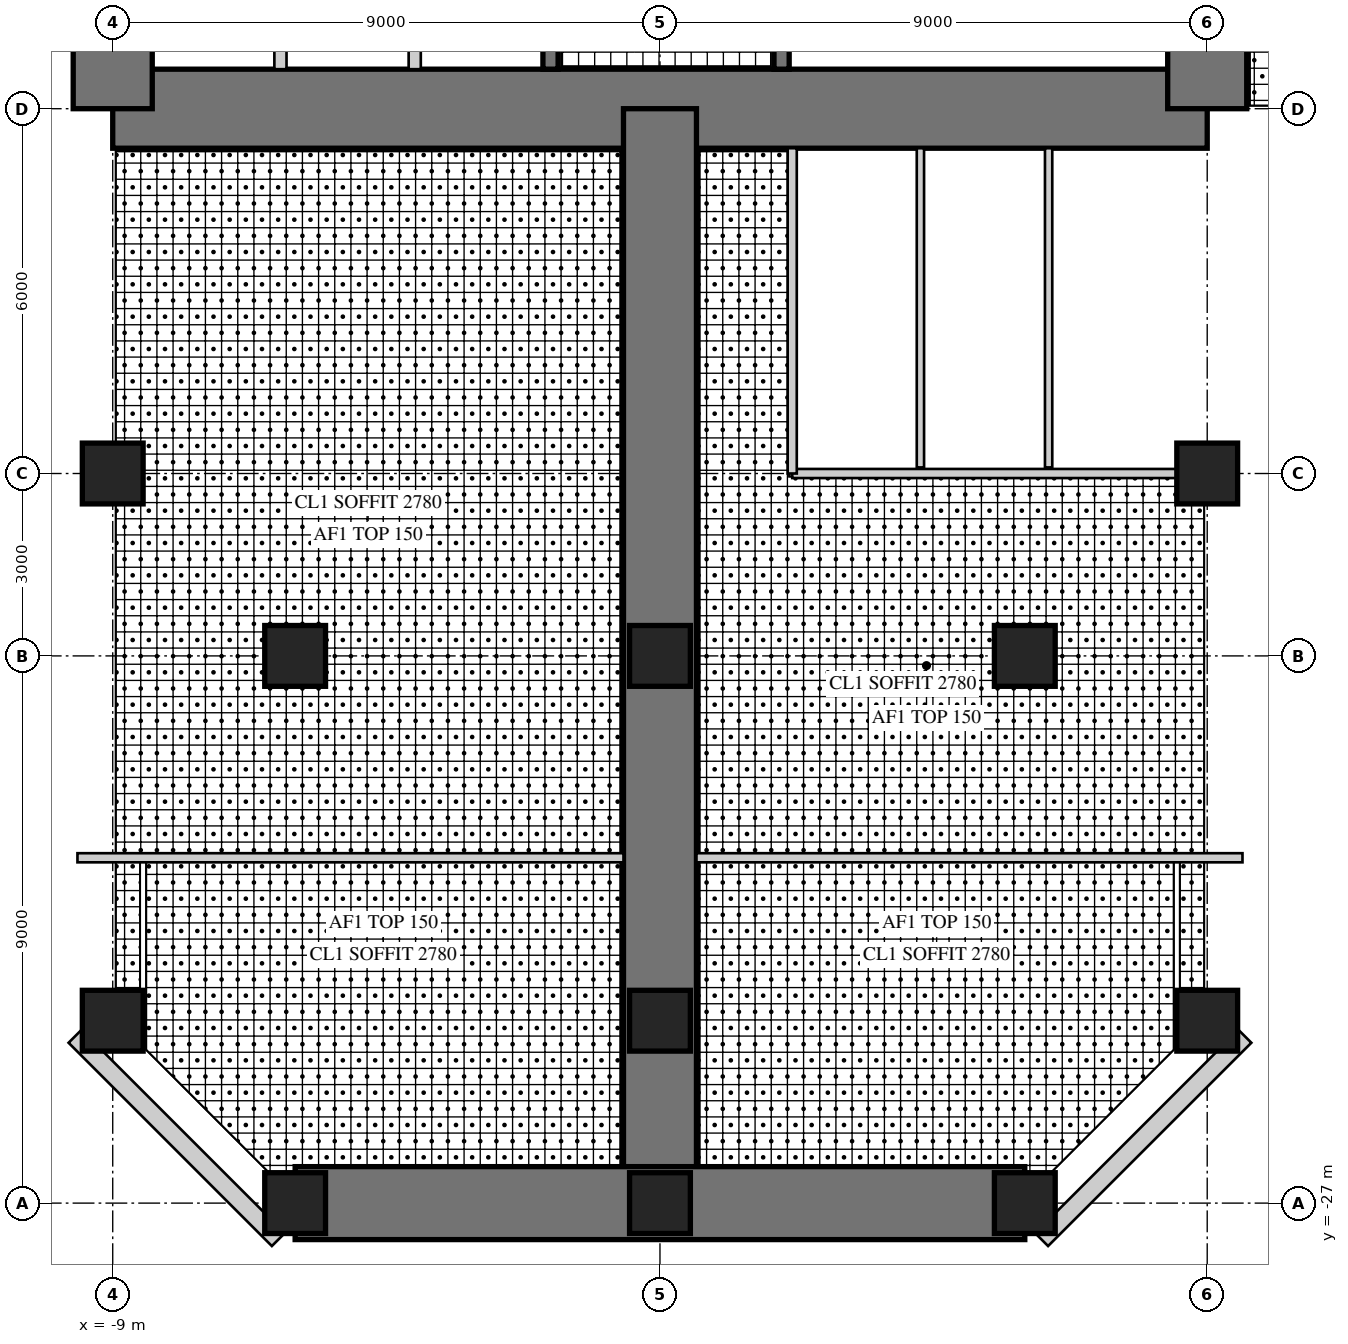
"""IFC4 building model, lengths in metres.
Left out: names, types, materials, properties, quantities, classifications, styles, units other than length and angle.
Written with IfcOpenShell. Run it as: python <this file> out.ifc"""

import sys

from ifc_helpers import new_model, si_unit, direction, frame, frame_2d, origin, origin_2d, place, context, subcontext, project, spatial, rectangle, hollow_rectangle, extrude, element, fill, save


model = new_model("IFC4")
c1 = context("Model", 3, precision=1e-05, world=origin(), true_north=direction((0.0, 1.0)))
c2 = subcontext(c1, "Body", "Model", "MODEL_VIEW")
j1 = project(units=[si_unit("LENGTHUNIT", "METRE"), si_unit("PLANEANGLEUNIT", "RADIAN")], contexts=[c1])
p1 = place(None, origin())
s1 = spatial("IfcSite", under=j1, at=p1, CompositionType="ELEMENT")
p2 = place(p1, origin())
s2 = spatial("IfcBuilding", under=s1, at=p2, CompositionType="ELEMENT")
p3 = place(p2, frame((0.0, 0.0, 144.5)))
s3 = spatial("IfcBuildingStorey", under=s2, at=p3, CompositionType="ELEMENT", Elevation=144.5)
p4 = place(p3, frame((-9.0, -9.0, 0.0), z_axis=(0.0, 0.0, 1.0), x_axis=(1.0, 0.0, 0.0)))
e1 = element("IfcWall", 1, at=p4, inside=s3, PredefinedType="SHEAR", context=c2, shape_type="SweptSolid", body=[
    extrude(rectangle(XDim=18.0, YDim=1.3, at=frame_2d((9.0, 0.0))), origin(), (0.0, 0.0, 1.0), 4.0),
])
p5 = place(p4, frame((9.8, 0.0, 0.0)))
e2 = element("IfcOpeningElement", 2, at=p5, cuts=e1, PredefinedType="OPENING", context=c2, shape_type="SweptSolid", body=[
    extrude(rectangle(XDim=1.0, YDim=2.4, at=frame_2d((0.5, 1.2))), frame((0.0, 0.66, 0.0), z_axis=(0.0, -1.0, 0.0), x_axis=(1.0, 0.0, 0.0)), (0.0, 0.0, 1.0), 1.32),
])
p6 = place(p3, frame((9.0, -9.0, 0.0), z_axis=(0.0, 0.0, 1.0), x_axis=(0.0, 1.0, 0.0)))
e3 = element("IfcWall", 3, at=p6, inside=s3, PredefinedType="SHEAR", context=c2, shape_type="SweptSolid", body=[
    extrude(rectangle(XDim=18.0, YDim=1.3, at=frame_2d((9.0, 0.0))), origin(), (0.0, 0.0, 1.0), 4.0),
])
p7 = place(p6, frame((9.8, 0.0, 0.0)))
e4 = element("IfcOpeningElement", 4, at=p7, cuts=e3, PredefinedType="OPENING", context=c2, shape_type="SweptSolid", body=[
    extrude(rectangle(XDim=1.0, YDim=2.4, at=frame_2d((0.5, 1.2))), frame((0.0, 0.66, 0.0), z_axis=(0.0, -1.0, 0.0), x_axis=(1.0, 0.0, 0.0)), (0.0, 0.0, 1.0), 1.32),
])
p8 = place(p3, frame((-9.0, 9.0, 0.0), z_axis=(0.0, 0.0, 1.0), x_axis=(0.0, -1.0, 0.0)))
e5 = element("IfcWall", 5, at=p8, inside=s3, PredefinedType="SHEAR", context=c2, shape_type="SweptSolid", body=[
    extrude(rectangle(XDim=18.0, YDim=1.3, at=frame_2d((9.0, 0.0))), origin(), (0.0, 0.0, 1.0), 4.0),
])
p9 = place(p8, frame((9.8, 0.0, 0.0)))
e6 = element("IfcOpeningElement", 6, at=p9, cuts=e5, PredefinedType="OPENING", context=c2, shape_type="SweptSolid", body=[
    extrude(rectangle(XDim=1.0, YDim=2.4, at=frame_2d((0.5, 1.2))), frame((0.0, 0.66, 0.0), z_axis=(0.0, -1.0, 0.0), x_axis=(1.0, 0.0, 0.0)), (0.0, 0.0, 1.0), 1.32),
])
p10 = place(p3, frame((-1.8, -1.875, 0.0), z_axis=(0.0, 0.0, 1.0), x_axis=(0.0, -1.0, 0.0)))
e7 = element("IfcWall", 7, at=p10, inside=s3, PredefinedType="SHEAR", context=c2, shape_type="SweptSolid", body=[
    extrude(rectangle(XDim=6.475, YDim=0.25, at=frame_2d((3.238, 0.0))), origin(), (0.0, 0.0, 1.0), 4.0),
])
p11 = place(p10, frame((1.875, 0.0, 0.0)))
e8 = element("IfcOpeningElement", 8, at=p11, cuts=e7, PredefinedType="OPENING", context=c2, shape_type="SweptSolid", body=[
    extrude(rectangle(XDim=1.6, YDim=2.4, at=frame_2d((0.8, 1.2))), frame((0.0, 0.135, 0.0), z_axis=(0.0, -1.0, 0.0), x_axis=(1.0, 0.0, 0.0)), (0.0, 0.0, 1.0), 0.27),
])
for number, where, z_axis, x_axis in (
    (9, (-4.033, -5.975, 0.0), (0.0, 0.0, 1.0), (0.0, -1.0, 0.0)),
    (10, (-6.242, -5.975, 0.0), (0.0, 0.0, 1.0), (0.0, -1.0, 0.0)),
):
    element("IfcWall", number, at=place(p3, frame(where, z_axis=z_axis, x_axis=x_axis)), inside=s3, PredefinedType="PARTITIONING", context=c2, shape_type="SweptSolid", body=[
        extrude(rectangle(XDim=2.375, YDim=0.2, at=frame_2d((1.188, 0.0))), origin(), (0.0, 0.0, 1.0), 4.0),
    ])
p12 = place(p3, frame((2.0, -1.675, 0.0), z_axis=(0.0, 0.0, 1.0), x_axis=(0.0, -1.0, 0.0)))
e11 = element("IfcWall", 11, at=p12, inside=s3, PredefinedType="SHEAR", context=c2, shape_type="SweptSolid", body=[
    extrude(rectangle(XDim=6.675, YDim=0.25, at=frame_2d((3.337, 0.0))), origin(), (0.0, 0.0, 1.0), 4.0),
])
p13 = place(p12, frame((0.725, 0.0, 0.0)))
e12 = element("IfcOpeningElement", 12, at=p13, cuts=e11, PredefinedType="OPENING", context=c2, shape_type="SweptSolid", body=[
    extrude(rectangle(XDim=1.0, YDim=2.1, at=frame_2d((0.5, 1.05))), frame((0.0, 0.135, 0.0), z_axis=(0.0, -1.0, 0.0), x_axis=(1.0, 0.0, 0.0)), (0.0, 0.0, 1.0), 0.27),
])
p14 = place(p3, frame((0.0, -9.0, 0.0), z_axis=(0.0, 0.0, 1.0), x_axis=(0.0, -1.0, 0.0)))
e13 = element("IfcWall", 13, at=p14, inside=s3, PredefinedType="SHEAR", context=c2, shape_type="SweptSolid", body=[
    extrude(rectangle(XDim=18.0, YDim=1.2, at=frame_2d((9.0, 0.0))), origin(), (0.0, 0.0, 1.0), 4.0),
])
p15 = place(p14, frame((9.8, 0.0, 0.0)))
e14 = element("IfcOpeningElement", 14, at=p15, cuts=e13, PredefinedType="OPENING", context=c2, shape_type="SweptSolid", body=[
    extrude(rectangle(XDim=1.0, YDim=2.2, at=frame_2d((0.5, 1.1))), frame((0.0, 0.61, 0.0), z_axis=(0.0, -1.0, 0.0), x_axis=(1.0, 0.0, 0.0)), (0.0, 0.0, 1.0), 1.22),
])
p16 = place(p3, frame((-6.0, -27.0, 0.0), z_axis=(0.0, 0.0, 1.0), x_axis=(1.0, 0.0, 0.0)))
e15 = element("IfcWall", 15, at=p16, inside=s3, PredefinedType="SHEAR", context=c2, shape_type="SweptSolid", body=[
    extrude(rectangle(XDim=12.0, YDim=1.2, at=frame_2d((6.0, 0.0))), origin(), (0.0, 0.0, 1.0), 4.0),
])
p17 = place(p16, frame((1.55, 0.0, 0.6)))
e16 = element("IfcOpeningElement", 16, at=p17, cuts=e15, PredefinedType="OPENING", context=c2, shape_type="SweptSolid", body=[
    extrude(rectangle(XDim=3.0, YDim=2.4, at=frame_2d((1.5, 1.2))), frame((0.0, 0.61, 0.0), z_axis=(0.0, -1.0, 0.0), x_axis=(1.0, 0.0, 0.0)), (0.0, 0.0, 1.0), 1.22),
])
p18 = place(p16, frame((7.45, 0.0, 0.6)))
e17 = element("IfcOpeningElement", 17, at=p18, cuts=e15, PredefinedType="OPENING", context=c2, shape_type="SweptSolid", body=[
    extrude(rectangle(XDim=3.0, YDim=2.4, at=frame_2d((1.5, 1.2))), frame((0.0, 0.61, 0.0), z_axis=(0.0, -1.0, 0.0), x_axis=(1.0, 0.0, 0.0)), (0.0, 0.0, 1.0), 1.22),
])
for number, where, z_axis, x_axis in (
    (18, (-9.0, -15.0, 0.0), (0.0, 0.0, 1.0), (1.0, 0.0, 0.0)),
    (19, (-9.0, -24.0, 0.0), (0.0, 0.0, 1.0), (1.0, 0.0, 0.0)),
    (20, (9.0, -15.0, 0.0), (0.0, 0.0, 1.0), (1.0, 0.0, 0.0)),
    (21, (9.0, -24.0, 0.0), (0.0, 0.0, 1.0), (1.0, 0.0, 0.0)),
    (22, (-6.0, -27.0, 0.0), (0.0, 0.0, 1.0), (1.0, 0.0, 0.0)),
    (23, (0.0, -27.0, 0.0), (0.0, 0.0, 1.0), (1.0, 0.0, 0.0)),
    (24, (6.0, -27.0, 0.0), (0.0, 0.0, 1.0), (1.0, 0.0, 0.0)),
    (25, (-6.0, -18.0, 0.0), (0.0, 0.0, 1.0), (1.0, 0.0, 0.0)),
    (26, (0.0, -18.0, 0.0), (0.0, 0.0, 1.0), (1.0, 0.0, 0.0)),
    (27, (6.0, -18.0, 0.0), (0.0, 0.0, 1.0), (1.0, 0.0, 0.0)),
    (28, (0.0, -24.0, 0.0), (0.0, 0.0, 1.0), (1.0, 0.0, 0.0)),
):
    element("IfcColumn", number, at=place(p3, frame(where, z_axis=z_axis, x_axis=x_axis)), inside=s3, PredefinedType="COLUMN", context=c2, shape_type="SweptSolid", body=[
        extrude(rectangle(XDim=1.0, YDim=1.0, at=origin_2d()), origin(), (0.0, 0.0, 1.0), 4.0),
    ])
p19 = place(p3, frame((-9.62, -24.257, 0.0), z_axis=(0.0, 0.0, 1.0), x_axis=(0.707106781187, -0.707106781187, 0.0)))
e29 = element("IfcWall", 29, at=p19, inside=s3, PredefinedType="SOLIDWALL", context=c2, shape_type="SweptSolid", body=[
    extrude(rectangle(XDim=4.728, YDim=0.3, at=frame_2d((2.364, 0.0))), origin(), (0.0, 0.0, 1.0), 3.8),
])
p20 = place(p19, frame((1.914, 0.0, 0.3)))
e30 = element("IfcOpeningElement", 30, at=p20, cuts=e29, PredefinedType="OPENING", context=c2, shape_type="SweptSolid", body=[
    extrude(rectangle(XDim=0.9, YDim=2.4, at=frame_2d((0.45, 1.2))), frame((0.0, 0.16, 0.0), z_axis=(0.0, -1.0, 0.0), x_axis=(1.0, 0.0, 0.0)), (0.0, 0.0, 1.0), 0.32),
])
p21 = place(p3, frame((6.277, -27.6, 0.0), z_axis=(0.0, 0.0, 1.0), x_axis=(0.707106781187, 0.707106781187, 0.0)))
e31 = element("IfcWall", 31, at=p21, inside=s3, PredefinedType="SOLIDWALL", context=c2, shape_type="SweptSolid", body=[
    extrude(rectangle(XDim=4.728, YDim=0.3, at=frame_2d((2.364, 0.0))), origin(), (0.0, 0.0, 1.0), 3.8),
])
p22 = place(p21, frame((1.914, 0.0, 0.3)))
e32 = element("IfcOpeningElement", 32, at=p22, cuts=e31, PredefinedType="OPENING", context=c2, shape_type="SweptSolid", body=[
    extrude(rectangle(XDim=0.9, YDim=2.4, at=frame_2d((0.45, 1.2))), frame((0.0, 0.16, 0.0), z_axis=(0.0, -1.0, 0.0), x_axis=(1.0, 0.0, 0.0)), (0.0, 0.0, 1.0), 0.32),
])
p23 = place(p3, frame((2.175, -15.0, 0.0), z_axis=(0.0, 0.0, 1.0), x_axis=(1.0, 0.0, 0.0)))
e33 = element("IfcWall", 33, at=p23, inside=s3, PredefinedType="PARTITIONING", context=c2, shape_type="SweptSolid", body=[
    extrude(rectangle(XDim=6.325, YDim=0.15, at=frame_2d((3.163, 0.0))), origin(), (0.0, 0.0, 1.0), 3.0),
])
p24 = place(p23, frame((0.554, 0.0, 0.0)))
e34 = element("IfcOpeningElement", 34, at=p24, cuts=e33, PredefinedType="OPENING", context=c2, shape_type="SweptSolid", body=[
    extrude(rectangle(XDim=1.0, YDim=2.1, at=frame_2d((0.5, 1.05))), frame((0.0, 0.085, 0.0), z_axis=(0.0, -1.0, 0.0), x_axis=(1.0, 0.0, 0.0)), (0.0, 0.0, 1.0), 0.17),
])
p25 = place(p23, frame((2.663, 0.0, 0.0)))
e35 = element("IfcOpeningElement", 35, at=p25, cuts=e33, PredefinedType="OPENING", context=c2, shape_type="SweptSolid", body=[
    extrude(rectangle(XDim=1.0, YDim=2.1, at=frame_2d((0.5, 1.05))), frame((0.0, 0.085, 0.0), z_axis=(0.0, -1.0, 0.0), x_axis=(1.0, 0.0, 0.0)), (0.0, 0.0, 1.0), 0.17),
])
p26 = place(p23, frame((4.771, 0.0, 0.0)))
e36 = element("IfcOpeningElement", 36, at=p26, cuts=e33, PredefinedType="OPENING", context=c2, shape_type="SweptSolid", body=[
    extrude(rectangle(XDim=1.0, YDim=2.1, at=frame_2d((0.5, 1.05))), frame((0.0, 0.085, 0.0), z_axis=(0.0, -1.0, 0.0), x_axis=(1.0, 0.0, 0.0)), (0.0, 0.0, 1.0), 0.17),
])
p27 = place(p3, frame((2.175, -9.65, 0.0), z_axis=(0.0, 0.0, 1.0), x_axis=(0.0, -1.0, 0.0)))
e37 = element("IfcWall", 37, at=p27, inside=s3, PredefinedType="PARTITIONING", context=c2, shape_type="SweptSolid", body=[
    extrude(rectangle(XDim=5.35, YDim=0.15, at=frame_2d((2.675, 0.0))), origin(), (0.0, 0.0, 1.0), 3.8),
])
for number, where, z_axis, x_axis in (
    (38, (4.283, -9.65, 0.0), (0.0, 0.0, 1.0), (0.0, -1.0, 0.0)),
    (39, (6.392, -9.65, 0.0), (0.0, 0.0, 1.0), (0.0, -1.0, 0.0)),
):
    element("IfcWall", number, at=place(p3, frame(where, z_axis=z_axis, x_axis=x_axis)), inside=s3, PredefinedType="PLUMBINGWALL", context=c2, shape_type="SweptSolid", body=[
        extrude(rectangle(XDim=5.25, YDim=0.12, at=frame_2d((2.625, 0.0))), origin(), (0.0, 0.0, 1.0), 3.8),
    ])
p28 = place(p3, frame((0.6, -21.32, 0.0), z_axis=(0.0, 0.0, 1.0), x_axis=(1.0, 0.0, 0.0)))
e40 = element("IfcWall", 40, at=p28, inside=s3, PredefinedType="PARTITIONING", context=c2, shape_type="SweptSolid", body=[
    extrude(rectangle(XDim=8.98, YDim=0.15, at=frame_2d((4.49, 0.0))), origin(), (0.0, 0.0, 1.0), 3.8),
])
p29 = place(p28, frame((0.45, 0.0, 0.0)))
e41 = element("IfcOpeningElement", 41, at=p29, cuts=e40, PredefinedType="OPENING", context=c2, shape_type="SweptSolid", body=[
    extrude(rectangle(XDim=1.0, YDim=2.2, at=frame_2d((0.5, 1.1))), frame((0.0, 0.085, 0.0), z_axis=(0.0, -1.0, 0.0), x_axis=(1.0, 0.0, 0.0)), (0.0, 0.0, 1.0), 0.17),
])
p30 = place(p3, frame((-9.58, -21.32, 0.0), z_axis=(0.0, 0.0, 1.0), x_axis=(1.0, 0.0, 0.0)))
e42 = element("IfcWall", 42, at=p30, inside=s3, PredefinedType="PARTITIONING", context=c2, shape_type="SweptSolid", body=[
    extrude(rectangle(XDim=8.98, YDim=0.15, at=frame_2d((4.49, 0.0))), origin(), (0.0, 0.0, 1.0), 3.8),
])
p31 = place(p30, frame((7.53, 0.0, 0.0)))
e43 = element("IfcOpeningElement", 43, at=p31, cuts=e42, PredefinedType="OPENING", context=c2, shape_type="SweptSolid", body=[
    extrude(rectangle(XDim=1.0, YDim=2.2, at=frame_2d((0.5, 1.1))), frame((0.0, 0.085, 0.0), z_axis=(0.0, -1.0, 0.0), x_axis=(1.0, 0.0, 0.0)), (0.0, 0.0, 1.0), 0.17),
])
p32 = place(p20, origin())
e44 = element("IfcWindow", 44, at=p32, inside=s3, PartitioningType="SINGLE_PANEL", PredefinedType="WINDOW", context=c2, shape_type="SweptSolid", body=[
    extrude(hollow_rectangle(XDim=0.9, YDim=2.4, WallThickness=0.06, at=frame_2d((0.45, 1.2))), frame((0.0, 0.03, 0.0), z_axis=(0.0, -1.0, 0.0), x_axis=(1.0, 0.0, 0.0)), (0.0, 0.0, 1.0), 0.06),
    extrude(rectangle(XDim=0.779, YDim=2.279, at=frame_2d((0.45, 1.2))), frame((0.0, 0.03, 0.0), z_axis=(0.0, -1.0, 0.0), x_axis=(1.0, 0.0, 0.0)), (0.0, 0.0, 1.0), 0.06),
])
fill(e30, e44)
p33 = place(p17, origin())
e45 = element("IfcWindow", 45, at=p33, inside=s3, PartitioningType="SINGLE_PANEL", PredefinedType="WINDOW", context=c2, shape_type="SweptSolid", body=[
    extrude(hollow_rectangle(XDim=3.0, YDim=2.4, WallThickness=0.06, at=frame_2d((1.5, 1.2))), frame((0.0, 0.03, 0.0), z_axis=(0.0, -1.0, 0.0), x_axis=(1.0, 0.0, 0.0)), (0.0, 0.0, 1.0), 0.06),
    extrude(rectangle(XDim=2.879, YDim=2.279, at=frame_2d((1.5, 1.2))), frame((0.0, 0.03, 0.0), z_axis=(0.0, -1.0, 0.0), x_axis=(1.0, 0.0, 0.0)), (0.0, 0.0, 1.0), 0.06),
])
fill(e16, e45)
p34 = place(p18, origin())
e46 = element("IfcWindow", 46, at=p34, inside=s3, PartitioningType="SINGLE_PANEL", PredefinedType="WINDOW", context=c2, shape_type="SweptSolid", body=[
    extrude(hollow_rectangle(XDim=3.0, YDim=2.4, WallThickness=0.06, at=frame_2d((1.5, 1.2))), frame((0.0, 0.03, 0.0), z_axis=(0.0, -1.0, 0.0), x_axis=(1.0, 0.0, 0.0)), (0.0, 0.0, 1.0), 0.06),
    extrude(rectangle(XDim=2.879, YDim=2.279, at=frame_2d((1.5, 1.2))), frame((0.0, 0.03, 0.0), z_axis=(0.0, -1.0, 0.0), x_axis=(1.0, 0.0, 0.0)), (0.0, 0.0, 1.0), 0.06),
])
fill(e17, e46)
p35 = place(p22, origin())
e47 = element("IfcWindow", 47, at=p35, inside=s3, PartitioningType="SINGLE_PANEL", PredefinedType="WINDOW", context=c2, shape_type="SweptSolid", body=[
    extrude(hollow_rectangle(XDim=0.9, YDim=2.4, WallThickness=0.06, at=frame_2d((0.45, 1.2))), frame((0.0, 0.03, 0.0), z_axis=(0.0, -1.0, 0.0), x_axis=(1.0, 0.0, 0.0)), (0.0, 0.0, 1.0), 0.06),
    extrude(rectangle(XDim=0.779, YDim=2.279, at=frame_2d((0.45, 1.2))), frame((0.0, 0.03, 0.0), z_axis=(0.0, -1.0, 0.0), x_axis=(1.0, 0.0, 0.0)), (0.0, 0.0, 1.0), 0.06),
])
fill(e32, e47)
p36 = place(p24, origin())
e48 = element("IfcDoor", 48, at=p36, inside=s3, OperationType="SINGLE_SWING_LEFT", PredefinedType="DOOR", context=c2, shape_type="SweptSolid", body=[
    extrude(rectangle(XDim=1.0, YDim=2.1, at=frame_2d((0.5, 1.05))), frame((0.0, 0.025, 0.0), z_axis=(0.0, -1.0, 0.0), x_axis=(1.0, 0.0, 0.0)), (0.0, 0.0, 1.0), 0.05),
])
fill(e34, e48)
p37 = place(p25, origin())
e49 = element("IfcDoor", 49, at=p37, inside=s3, OperationType="SINGLE_SWING_LEFT", PredefinedType="DOOR", context=c2, shape_type="SweptSolid", body=[
    extrude(rectangle(XDim=1.0, YDim=2.1, at=frame_2d((0.5, 1.05))), frame((0.0, 0.025, 0.0), z_axis=(0.0, -1.0, 0.0), x_axis=(1.0, 0.0, 0.0)), (0.0, 0.0, 1.0), 0.05),
])
fill(e35, e49)
p38 = place(p26, origin())
e50 = element("IfcDoor", 50, at=p38, inside=s3, OperationType="SINGLE_SWING_LEFT", PredefinedType="DOOR", context=c2, shape_type="SweptSolid", body=[
    extrude(rectangle(XDim=1.0, YDim=2.1, at=frame_2d((0.5, 1.05))), frame((0.0, 0.025, 0.0), z_axis=(0.0, -1.0, 0.0), x_axis=(1.0, 0.0, 0.0)), (0.0, 0.0, 1.0), 0.05),
])
fill(e36, e50)
p39 = place(p29, frame((1.0, 0.0, 0.0), z_axis=(0.0, 0.0, 1.0), x_axis=(-1.0, 0.0, 0.0)))
e51 = element("IfcDoor", 51, at=p39, inside=s3, OperationType="SINGLE_SWING_RIGHT", PredefinedType="DOOR", context=c2, shape_type="SweptSolid", body=[
    extrude(rectangle(XDim=1.0, YDim=2.2, at=frame_2d((0.5, 1.1))), frame((0.0, 0.025, 0.0), z_axis=(0.0, -1.0, 0.0), x_axis=(1.0, 0.0, 0.0)), (0.0, 0.0, 1.0), 0.05),
])
fill(e41, e51)
p40 = place(p31, frame((1.0, 0.0, 0.0), z_axis=(0.0, 0.0, 1.0), x_axis=(-1.0, 0.0, 0.0)))
e52 = element("IfcDoor", 52, at=p40, inside=s3, OperationType="SINGLE_SWING_LEFT", PredefinedType="DOOR", context=c2, shape_type="SweptSolid", body=[
    extrude(rectangle(XDim=1.0, YDim=2.2, at=frame_2d((0.5, 1.1))), frame((0.0, 0.025, 0.0), z_axis=(0.0, -1.0, 0.0), x_axis=(1.0, 0.0, 0.0)), (0.0, 0.0, 1.0), 0.05),
])
fill(e43, e52)
p41 = place(p15, origin())
e53 = element("IfcDoor", 53, at=p41, inside=s3, OperationType="SINGLE_SWING_RIGHT", PredefinedType="DOOR", context=c2, shape_type="SweptSolid", body=[
    extrude(rectangle(XDim=1.0, YDim=2.2, at=frame_2d((0.5, 1.1))), frame((0.0, 0.025, 0.0), z_axis=(0.0, -1.0, 0.0), x_axis=(1.0, 0.0, 0.0)), (0.0, 0.0, 1.0), 0.05),
])
fill(e14, e53)
p42 = place(p5, frame((1.0, 0.0, 0.0), z_axis=(0.0, 0.0, 1.0), x_axis=(-1.0, 0.0, 0.0)))
e54 = element("IfcDoor", 54, at=p42, inside=s3, OperationType="SINGLE_SWING_RIGHT", PredefinedType="DOOR", context=c2, shape_type="SweptSolid", body=[
    extrude(rectangle(XDim=1.0, YDim=2.4, at=frame_2d((0.5, 1.2))), frame((0.0, -0.005, 0.0), z_axis=(0.0, -1.0, 0.0), x_axis=(1.0, 0.0, 0.0)), (0.0, 0.0, 1.0), 0.05),
])
fill(e2, e54)
save(model, sys.argv[1])
